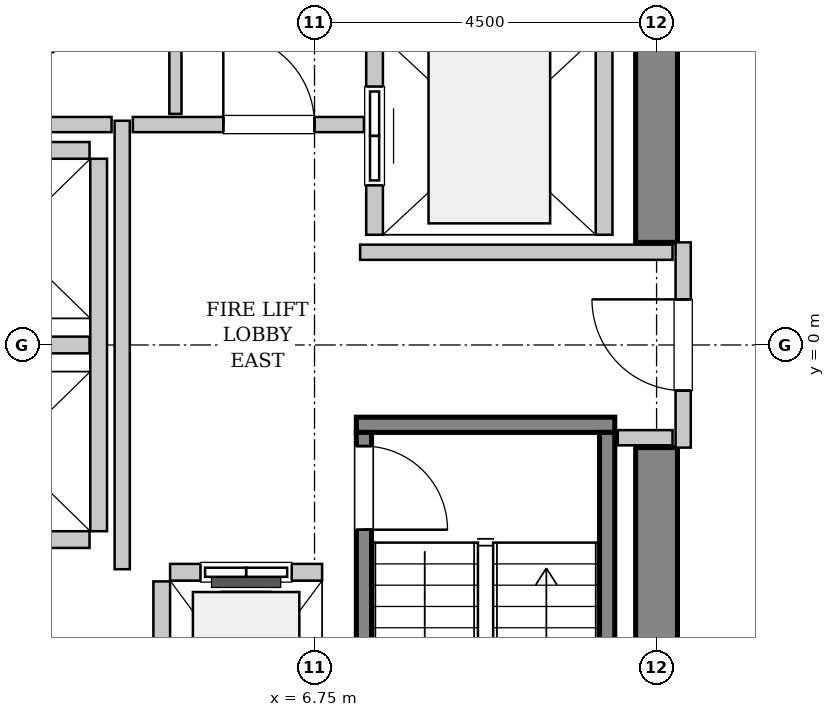
"""IFC4 building model, lengths in metres.
Left out: names, types, materials, properties, quantities, classifications, styles, units other than length and angle.
Written with IfcOpenShell. Run it as: python <this file> out.ifc"""

import sys

from ifc_helpers import new_model, si_unit, direction, frame, frame_2d, origin, place, context, subcontext, project, spatial, rectangle, extrude, source, transform, mapped, element, fill, save


model = new_model("IFC4")
c1 = context("Model", 3, precision=1e-05, world=origin(), true_north=direction((0.0, 1.0)))
c2 = subcontext(c1, "Body", "Model", "MODEL_VIEW")
j1 = project(units=[si_unit("LENGTHUNIT", "METRE"), si_unit("PLANEANGLEUNIT", "RADIAN")], contexts=[c1])
p1 = place(None, origin())
s1 = spatial("IfcSite", under=j1, at=p1, CompositionType="ELEMENT")
p2 = place(p1, origin())
s2 = spatial("IfcBuilding", under=s1, at=p2, CompositionType="ELEMENT")
p3 = place(p2, frame((0.0, 0.0, 183.0)))
s3 = spatial("IfcBuildingStorey", under=s2, at=p3, CompositionType="ELEMENT", Elevation=183.0)
m1 = source(origin(), c2, "Body", "SweptSolid", [
    extrude(rectangle(XDim=7.375, YDim=0.55, at=frame_2d((3.688, 0.0))), origin(), (0.0, 0.0, 1.0), 3.8),
])
for number, where, z_axis, x_axis in (
    (1, (11.25, -8.725, 0.0), (0.0, 0.0, 1.0), (0.0, 1.0, 0.0)),
    (2, (11.25, 1.35, 0.0), (0.0, 0.0, 1.0), (0.0, 1.0, 0.0)),
):
    element("IfcWall", number, at=place(p3, frame(where, z_axis=z_axis, x_axis=x_axis)), inside=s3, PredefinedType="SHEAR", context=c2, shape_type="MappedRepresentation", body=[
        mapped(m1, transform((0.0, 0.0, 0.0), x_axis=(1.0, 0.0, 0.0), y_axis=(0.0, 1.0, 0.0), z_axis=(0.0, 0.0, 1.0), scale=1.0)),
    ])
m2 = source(origin(), c2, "Body", "SweptSolid", [
    extrude(rectangle(XDim=3.4, YDim=0.2, at=frame_2d((1.7, 0.0))), origin(), (0.0, 0.0, 1.0), 3.8),
])
p4 = place(p3, frame((7.3, -1.05, 0.0), z_axis=(0.0, 0.0, 1.0), x_axis=(1.0, 0.0, 0.0)))
e3 = element("IfcWall", 3, at=p4, inside=s3, PredefinedType="SOLIDWALL", context=c2, shape_type="MappedRepresentation", body=[
    mapped(m2, transform((0.0, 0.0, 0.0), x_axis=(1.0, 0.0, 0.0), y_axis=(0.0, 1.0, 0.0), z_axis=(0.0, 0.0, 1.0), scale=1.0)),
])
m3 = source(origin(), c2, "Body", "SweptSolid", [
    extrude(rectangle(XDim=7.1, YDim=0.2, at=frame_2d((3.55, 0.0))), origin(), (0.0, 0.0, 1.0), 3.8),
])
p5 = place(p3, frame((7.4, -1.15, 0.0), z_axis=(0.0, 0.0, 1.0), x_axis=(0.0, -1.0, 0.0)))
e4 = element("IfcWall", 4, at=p5, inside=s3, PredefinedType="SOLIDWALL", context=c2, shape_type="MappedRepresentation", body=[
    mapped(m3, transform((0.0, 0.0, 0.0), x_axis=(1.0, 0.0, 0.0), y_axis=(0.0, 1.0, 0.0), z_axis=(0.0, 0.0, 1.0), scale=1.0)),
])
p6 = place(p5, frame((0.18, 0.0, 0.0)))
e5 = element("IfcOpeningElement", 5, at=p6, cuts=e4, PredefinedType="OPENING", context=c2, shape_type="SweptSolid", body=[
    extrude(rectangle(XDim=1.1, YDim=2.15, at=frame_2d((0.55, 1.075))), frame((0.0, 0.11, 0.0), z_axis=(0.0, -1.0, 0.0), x_axis=(1.0, 0.0, 0.0)), (0.0, 0.0, 1.0), 0.22),
])
p7 = place(p3, frame((10.6, -1.15, 0.0), z_axis=(0.0, 0.0, 1.0), x_axis=(0.0, -1.0, 0.0)))
e6 = element("IfcWall", 6, at=p7, inside=s3, PredefinedType="SOLIDWALL", context=c2, shape_type="MappedRepresentation", body=[
    mapped(m3, transform((0.0, 0.0, 0.0), x_axis=(1.0, 0.0, 0.0), y_axis=(0.0, 1.0, 0.0), z_axis=(0.0, 0.0, 1.0), scale=1.0)),
])
m4 = source(origin(), c2, "Body", "SweptSolid", [
    extrude(rectangle(XDim=2.0, YDim=0.22, at=frame_2d((1.0, 0.0))), origin(), (0.0, 0.0, 1.0), 3.535),
])
p8 = place(p3, frame((6.85, -2.99, 0.0), z_axis=(0.0, 0.0, 1.0), x_axis=(-1.0, 0.0, 0.0)))
e7 = element("IfcWall", 7, at=p8, inside=s3, PredefinedType="SOLIDWALL", context=c2, shape_type="MappedRepresentation", body=[
    mapped(m4, transform((0.0, 0.0, 0.0), x_axis=(1.0, 0.0, 0.0), y_axis=(0.0, 1.0, 0.0), z_axis=(0.0, 0.0, 1.0), scale=1.0)),
])
p9 = place(p8, frame((0.4, 0.0, 0.0)))
e8 = element("IfcOpeningElement", 8, at=p9, cuts=e7, PredefinedType="OPENING", context=c2, shape_type="SweptSolid", body=[
    extrude(rectangle(XDim=1.2, YDim=2.2, at=frame_2d((0.6, 1.1))), frame((0.0, 0.12, 0.0), z_axis=(0.0, -1.0, 0.0), x_axis=(1.0, 0.0, 0.0)), (0.0, 0.0, 1.0), 0.24),
])
m5 = source(origin(), c2, "Body", "SweptSolid", [
    extrude(rectangle(XDim=2.68, YDim=0.22, at=frame_2d((1.34, 0.0))), origin(), (0.0, 0.0, 1.0), 3.535),
])
p10 = place(p3, frame((4.74, -3.11, 0.0), z_axis=(0.0, 0.0, 1.0), x_axis=(0.0, -1.0, 0.0)))
e9 = element("IfcWall", 9, at=p10, inside=s3, PredefinedType="SOLIDWALL", context=c2, shape_type="MappedRepresentation", body=[
    mapped(m5, transform((0.0, 0.0, 0.0), x_axis=(1.0, 0.0, 0.0), y_axis=(0.0, 1.0, 0.0), z_axis=(0.0, 0.0, 1.0), scale=1.0)),
])
m6 = source(origin(), c2, "Body", "SweptSolid", [
    extrude(rectangle(XDim=5.45, YDim=0.22, at=frame_2d((2.725, 0.0))), origin(), (0.0, 0.0, 1.0), 3.535),
])
p11 = place(p3, frame((7.54, 6.9, 0.0), z_axis=(0.0, 0.0, 1.0), x_axis=(0.0, -1.0, 0.0)))
e10 = element("IfcWall", 10, at=p11, inside=s3, PredefinedType="SOLIDWALL", context=c2, shape_type="MappedRepresentation", body=[
    mapped(m6, transform((0.0, 0.0, 0.0), x_axis=(1.0, 0.0, 0.0), y_axis=(0.0, 1.0, 0.0), z_axis=(0.0, 0.0, 1.0), scale=1.0)),
])
p12 = place(p11, frame((3.5, 0.0, 0.0)))
e11 = element("IfcOpeningElement", 11, at=p12, cuts=e10, PredefinedType="OPENING", context=c2, shape_type="SweptSolid", body=[
    extrude(rectangle(XDim=1.3, YDim=2.3, at=frame_2d((0.65, 1.15))), frame((0.0, 0.12, 0.0), z_axis=(0.0, -1.0, 0.0), x_axis=(1.0, 0.0, 0.0)), (0.0, 0.0, 1.0), 0.24),
])
p13 = place(p11, frame((0.65, 0.0, 0.0)))
e12 = element("IfcOpeningElement", 12, at=p13, cuts=e10, PredefinedType="OPENING", context=c2, shape_type="SweptSolid", body=[
    extrude(rectangle(XDim=1.3, YDim=2.3, at=frame_2d((0.65, 1.15))), frame((0.0, 0.12, 0.0), z_axis=(0.0, -1.0, 0.0), x_axis=(1.0, 0.0, 0.0)), (0.0, 0.0, 1.0), 0.24),
])
p14 = place(p3, frame((10.56, 1.45, 0.0), z_axis=(0.0, 0.0, 1.0), x_axis=(0.0, 1.0, 0.0)))
e13 = element("IfcWall", 13, at=p14, inside=s3, PredefinedType="SOLIDWALL", context=c2, shape_type="MappedRepresentation", body=[
    mapped(m6, transform((0.0, 0.0, 0.0), x_axis=(1.0, 0.0, 0.0), y_axis=(0.0, 1.0, 0.0), z_axis=(0.0, 0.0, 1.0), scale=1.0)),
])
m7 = source(origin(), c2, "Body", "SweptSolid", [
    extrude(rectangle(XDim=4.9, YDim=0.22, at=frame_2d((2.45, 0.0))), origin(), (0.0, 0.0, 1.0), 3.535),
])
p15 = place(p3, frame((3.91, -2.45, 0.0), z_axis=(0.0, 0.0, 1.0), x_axis=(0.0, 1.0, 0.0)))
e14 = element("IfcWall", 14, at=p15, inside=s3, PredefinedType="SOLIDWALL", context=c2, shape_type="MappedRepresentation", body=[
    mapped(m7, transform((0.0, 0.0, 0.0), x_axis=(1.0, 0.0, 0.0), y_axis=(0.0, 1.0, 0.0), z_axis=(0.0, 0.0, 1.0), scale=1.0)),
])
m8 = source(origin(), c2, "Body", "SweptSolid", [
    extrude(rectangle(XDim=2.13, YDim=0.22, at=frame_2d((1.065, 0.0))), origin(), (0.0, 0.0, 1.0), 3.535),
])
for number, where, z_axis, x_axis in (
    (15, (1.66, -2.56, 0.0), (0.0, 0.0, 1.0), (1.0, 0.0, 0.0)),
    (16, (1.66, 0.0, 0.0), (0.0, 0.0, 1.0), (1.0, 0.0, 0.0)),
    (17, (3.79, 2.56, 0.0), (0.0, 0.0, 1.0), (-1.0, 0.0, 0.0)),
):
    element("IfcWall", number, at=place(p3, frame(where, z_axis=z_axis, x_axis=x_axis)), inside=s3, PredefinedType="SOLIDWALL", context=c2, shape_type="MappedRepresentation", body=[
        mapped(m8, transform((0.0, 0.0, 0.0), x_axis=(1.0, 0.0, 0.0), y_axis=(0.0, 1.0, 0.0), z_axis=(0.0, 0.0, 1.0), scale=1.0)),
    ])
m9 = source(origin(), c2, "Body", "SweptSolid", [
    extrude(rectangle(XDim=2.7, YDim=0.2, at=frame_2d((1.35, 0.0))), origin(), (0.0, 0.0, 1.0), 2.425),
])
p16 = place(p3, frame((11.6, -1.35, 0.0), z_axis=(0.0, 0.0, 1.0), x_axis=(0.0, 1.0, 0.0)))
e18 = element("IfcWall", 18, at=p16, inside=s3, PredefinedType="PARTITIONING", context=c2, shape_type="MappedRepresentation", body=[
    mapped(m9, transform((0.0, 0.0, 0.0), x_axis=(1.0, 0.0, 0.0), y_axis=(0.0, 1.0, 0.0), z_axis=(0.0, 0.0, 1.0), scale=1.0)),
])
p17 = place(p16, frame((0.75, 0.0, 0.0)))
e19 = element("IfcOpeningElement", 19, at=p17, cuts=e18, PredefinedType="OPENING", context=c2, shape_type="SweptSolid", body=[
    extrude(rectangle(XDim=1.2, YDim=2.15, at=frame_2d((0.6, 1.075))), frame((0.0, 0.11, 0.0), z_axis=(0.0, -1.0, 0.0), x_axis=(1.0, 0.0, 0.0)), (0.0, 0.0, 1.0), 0.22),
])
m10 = source(origin(), c2, "Body", "SweptSolid", [
    extrude(rectangle(XDim=5.9, YDim=0.2, at=frame_2d((2.95, 0.0))), origin(), (0.0, 0.0, 1.0), 3.535),
])
p18 = place(p3, frame((4.22, -2.95, 0.0), z_axis=(0.0, 0.0, 1.0), x_axis=(0.0, 1.0, 0.0)))
e20 = element("IfcWall", 20, at=p18, inside=s3, PredefinedType="PARTITIONING", context=c2, shape_type="MappedRepresentation", body=[
    mapped(m10, transform((0.0, 0.0, 0.0), x_axis=(1.0, 0.0, 0.0), y_axis=(0.0, 1.0, 0.0), z_axis=(0.0, 0.0, 1.0), scale=1.0)),
])
m11 = source(origin(), c2, "Body", "SweptSolid", [
    extrude(rectangle(XDim=2.52, YDim=0.2, at=frame_2d((1.26, 0.0))), origin(), (0.0, 0.0, 1.0), 3.535),
])
p19 = place(p3, frame((1.56, 2.9, 0.0), z_axis=(0.0, 0.0, 1.0), x_axis=(1.0, 0.0, 0.0)))
e21 = element("IfcWall", 21, at=p19, inside=s3, PredefinedType="PARTITIONING", context=c2, shape_type="MappedRepresentation", body=[
    mapped(m11, transform((0.0, 0.0, 0.0), x_axis=(1.0, 0.0, 0.0), y_axis=(0.0, 1.0, 0.0), z_axis=(0.0, 0.0, 1.0), scale=1.0)),
])
m12 = source(origin(), c2, "Body", "SweptSolid", [
    extrude(rectangle(XDim=3.04, YDim=0.2, at=frame_2d((1.52, 0.0))), origin(), (0.0, 0.0, 1.0), 3.535),
])
p20 = place(p3, frame((4.36, 2.9, 0.0), z_axis=(0.0, 0.0, 1.0), x_axis=(1.0, 0.0, 0.0)))
e22 = element("IfcWall", 22, at=p20, inside=s3, PredefinedType="PARTITIONING", context=c2, shape_type="MappedRepresentation", body=[
    mapped(m12, transform((0.0, 0.0, 0.0), x_axis=(1.0, 0.0, 0.0), y_axis=(0.0, 1.0, 0.0), z_axis=(0.0, 0.0, 1.0), scale=1.0)),
])
p21 = place(p20, frame((1.19, 0.0, 0.0)))
e23 = element("IfcOpeningElement", 23, at=p21, cuts=e22, PredefinedType="OPENING", context=c2, shape_type="SweptSolid", body=[
    extrude(rectangle(XDim=1.2, YDim=2.15, at=frame_2d((0.6, 1.075))), frame((0.0, 0.11, 0.0), z_axis=(0.0, -1.0, 0.0), x_axis=(1.0, 0.0, 0.0)), (0.0, 0.0, 1.0), 0.22),
])
m13 = source(origin(), c2, "Body", "SweptSolid", [
    extrude(rectangle(XDim=4.11, YDim=0.2, at=frame_2d((2.055, 0.0))), origin(), (0.0, 0.0, 1.0), 3.535),
])
p22 = place(p3, frame((7.35, 1.22, 0.0), z_axis=(0.0, 0.0, 1.0), x_axis=(1.0, 0.0, 0.0)))
e24 = element("IfcWall", 24, at=p22, inside=s3, PredefinedType="PARTITIONING", context=c2, shape_type="MappedRepresentation", body=[
    mapped(m13, transform((0.0, 0.0, 0.0), x_axis=(1.0, 0.0, 0.0), y_axis=(0.0, 1.0, 0.0), z_axis=(0.0, 0.0, 1.0), scale=1.0)),
])
m14 = source(origin(), c2, "Body", "SweptSolid", [
    extrude(rectangle(XDim=0.72, YDim=0.2, at=frame_2d((0.36, 0.0))), origin(), (0.0, 0.0, 1.0), 3.535),
])
p23 = place(p3, frame((10.74, -1.22, 0.0), z_axis=(0.0, 0.0, 1.0), x_axis=(1.0, 0.0, 0.0)))
e25 = element("IfcWall", 25, at=p23, inside=s3, PredefinedType="PARTITIONING", context=c2, shape_type="MappedRepresentation", body=[
    mapped(m14, transform((0.0, 0.0, 0.0), x_axis=(1.0, 0.0, 0.0), y_axis=(0.0, 1.0, 0.0), z_axis=(0.0, 0.0, 1.0), scale=1.0)),
])
m15 = source(origin(), c2, "Body", "SweptSolid", [
    extrude(rectangle(XDim=5.45, YDim=0.16, at=frame_2d((2.725, 0.0))), origin(), (0.0, 0.0, 1.0), 3.535),
])
p24 = place(p3, frame((4.92, 3.04, 0.0), z_axis=(0.0, 0.0, 1.0), x_axis=(0.0, 1.0, 0.0)))
e26 = element("IfcWall", 26, at=p24, inside=s3, PredefinedType="PARTITIONING", context=c2, shape_type="MappedRepresentation", body=[
    mapped(m15, transform((0.0, 0.0, 0.0), x_axis=(1.0, 0.0, 0.0), y_axis=(0.0, 1.0, 0.0), z_axis=(0.0, 0.0, 1.0), scale=1.0)),
])
m16 = source(origin(), c2, "Body", "SweptSolid", [
    extrude(rectangle(XDim=1.1, YDim=2.15, at=frame_2d((0.55, 1.075))), frame((0.0, 0.025, 0.0), z_axis=(0.0, -1.0, 0.0), x_axis=(1.0, 0.0, 0.0)), (0.0, 0.0, 1.0), 0.05),
])
p25 = place(p6, origin())
e27 = element("IfcDoor", 27, at=p25, inside=s3, OperationType="SINGLE_SWING_RIGHT", PredefinedType="DOOR", context=c2, shape_type="MappedRepresentation", body=[
    mapped(m16, transform((0.0, 0.0, 0.0), x_axis=(1.0, 0.0, 0.0), y_axis=(0.0, 1.0, 0.0), z_axis=(0.0, 0.0, 1.0), scale=1.0)),
])
fill(e5, e27)
m17 = source(origin(), c2, "Body", "SweptSolid", [
    extrude(rectangle(XDim=1.2, YDim=2.2, at=frame_2d((0.6, 1.1))), frame((0.0, 0.025, 0.0), z_axis=(0.0, -1.0, 0.0), x_axis=(1.0, 0.0, 0.0)), (0.0, 0.0, 1.0), 0.05),
])
p26 = place(p9, origin())
e28 = element("IfcDoor", 28, at=p26, inside=s3, OperationType="SLIDING_TO_LEFT", PredefinedType="DOOR", context=c2, shape_type="MappedRepresentation", body=[
    mapped(m17, transform((0.0, 0.0, 0.0), x_axis=(1.0, 0.0, 0.0), y_axis=(0.0, 1.0, 0.0), z_axis=(0.0, 0.0, 1.0), scale=1.0)),
])
fill(e8, e28)
m18 = source(origin(), c2, "Body", "SweptSolid", [
    extrude(rectangle(XDim=1.3, YDim=2.3, at=frame_2d((0.65, 1.15))), frame((0.0, 0.025, 0.0), z_axis=(0.0, -1.0, 0.0), x_axis=(1.0, 0.0, 0.0)), (0.0, 0.0, 1.0), 0.05),
])
p27 = place(p12, origin())
e29 = element("IfcDoor", 29, at=p27, inside=s3, OperationType="SLIDING_TO_RIGHT", PredefinedType="DOOR", context=c2, shape_type="MappedRepresentation", body=[
    mapped(m18, transform((0.0, 0.0, 0.0), x_axis=(1.0, 0.0, 0.0), y_axis=(0.0, 1.0, 0.0), z_axis=(0.0, 0.0, 1.0), scale=1.0)),
])
fill(e11, e29)
m19 = source(origin(), c2, "Body", "SweptSolid", [
    extrude(rectangle(XDim=1.2, YDim=2.15, at=frame_2d((0.6, 1.075))), frame((0.0, 0.025, 0.0), z_axis=(0.0, -1.0, 0.0), x_axis=(1.0, 0.0, 0.0)), (0.0, 0.0, 1.0), 0.05),
])
p28 = place(p17, origin())
e30 = element("IfcDoor", 30, at=p28, inside=s3, OperationType="SINGLE_SWING_RIGHT", PredefinedType="DOOR", context=c2, shape_type="MappedRepresentation", body=[
    mapped(m19, transform((0.0, 0.0, 0.0), x_axis=(1.0, 0.0, 0.0), y_axis=(0.0, 1.0, 0.0), z_axis=(0.0, 0.0, 1.0), scale=1.0)),
])
fill(e19, e30)
p29 = place(p21, origin())
e31 = element("IfcDoor", 31, at=p29, inside=s3, OperationType="SINGLE_SWING_LEFT", PredefinedType="DOOR", context=c2, shape_type="MappedRepresentation", body=[
    mapped(m19, transform((0.0, 0.0, 0.0), x_axis=(1.0, 0.0, 0.0), y_axis=(0.0, 1.0, 0.0), z_axis=(0.0, 0.0, 1.0), scale=1.0)),
])
fill(e23, e31)
save(model, sys.argv[1])
